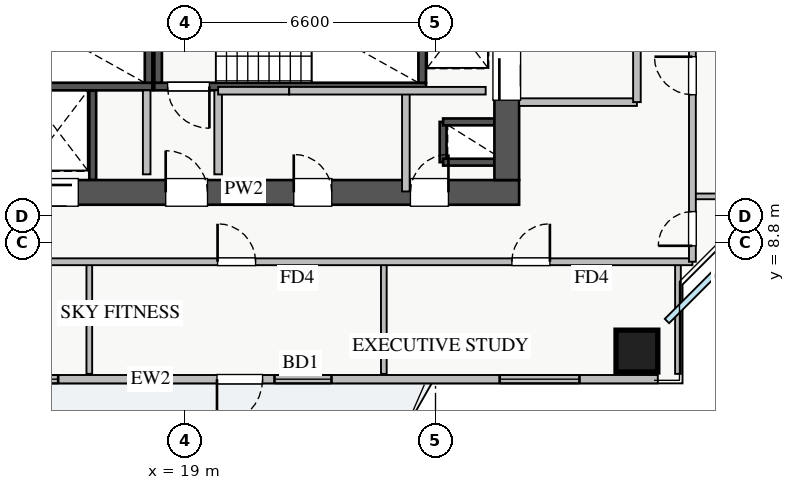
"""IFC4 building model, lengths in metres.
Left out: names, types, materials, properties, quantities, classifications, styles, units other than length and angle.
Written with IfcOpenShell. Run it as: python <this file> out.ifc"""

import sys

from ifc_helpers import new_model, si_unit, direction, frame, frame_2d, origin, origin_2d, place, context, subcontext, project, spatial, rectangle, extrude, source, transform, mapped, element, fill, save


model = new_model("IFC4")
c1 = context("Model", 3, precision=1e-05, world=origin(), true_north=direction((0.0, 1.0)))
c2 = subcontext(c1, "Body", "Model", "MODEL_VIEW")
j1 = project(units=[si_unit("LENGTHUNIT", "METRE"), si_unit("PLANEANGLEUNIT", "RADIAN")], contexts=[c1])
p1 = place(None, origin())
s1 = spatial("IfcSite", under=j1, at=p1, CompositionType="ELEMENT")
p2 = place(p1, origin())
s2 = spatial("IfcBuilding", under=s1, at=p2, CompositionType="ELEMENT")
p3 = place(p2, frame((0.0, 0.0, 106.75)))
s3 = spatial("IfcBuildingStorey", under=s2, at=p3, CompositionType="ELEMENT", Elevation=106.75)
p4 = place(p3, frame((25.8, 10.92, 0.0), z_axis=(0.0, 0.0, 1.0), x_axis=(0.0, 1.0, 0.0)))
e1 = element("IfcWall", 1, at=p4, inside=s3, PredefinedType="SHEAR", context=c2, shape_type="SweptSolid", body=[
    extrude(rectangle(XDim=1.06, YDim=0.18, at=frame_2d((0.53, 0.0))), origin(), (0.0, 0.0, 1.0), 3.07),
])
for number, where, z_axis, x_axis in (
    (2, (25.8, 11.98, 0.0), (0.0, 0.0, 1.0), (1.0, 0.0, 0.0)),
    (3, (25.8, 10.92, 0.0), (0.0, 0.0, 1.0), (1.0, 0.0, 0.0)),
):
    element("IfcWall", number, at=place(p3, frame(where, z_axis=z_axis, x_axis=x_axis)), inside=s3, PredefinedType="SHEAR", context=c2, shape_type="SweptSolid", body=[
        extrude(rectangle(XDim=1.35, YDim=0.18, at=frame_2d((0.675, 0.0))), origin(), (0.0, 0.0, 1.0), 3.07),
    ])
p5 = place(p3, frame((14.62, 12.8, 0.0), z_axis=(0.0, 0.0, 1.0), x_axis=(1.0, 0.0, 0.0)))
e4 = element("IfcWall", 4, at=p5, inside=s3, PredefinedType="SHEAR", context=c2, shape_type="SweptSolid", body=[
    extrude(rectangle(XDim=1.96, YDim=0.18, at=frame_2d((0.98, 0.0))), origin(), (0.0, 0.0, 1.0), 3.07),
])
p6 = place(p3, frame((16.58, 10.45, 0.0), z_axis=(0.0, 0.0, 1.0), x_axis=(0.0, 1.0, 0.0)))
e5 = element("IfcWall", 5, at=p6, inside=s3, PredefinedType="SHEAR", context=c2, shape_type="SweptSolid", body=[
    extrude(rectangle(XDim=2.35, YDim=0.18, at=frame_2d((1.175, 0.0))), origin(), (0.0, 0.0, 1.0), 3.07),
])
p7 = place(p3, frame((10.85, 12.91, 0.0), z_axis=(0.0, 0.0, 1.0), x_axis=(1.0, 0.0, 0.0)))
e6 = element("IfcWall", 6, at=p7, inside=s3, PredefinedType="SHEAR", context=c2, shape_type="SweptSolid", body=[
    extrude(rectangle(XDim=7.3, YDim=0.2, at=frame_2d((3.65, 0.0))), origin(), (0.0, 0.0, 1.0), 3.25),
])
p8 = place(p7, frame((0.35, 0.0, 0.0)))
e7 = element("IfcOpeningElement", 7, at=p8, cuts=e6, PredefinedType="OPENING", context=c2, shape_type="SweptSolid", body=[
    extrude(rectangle(XDim=1.1, YDim=2.05, at=frame_2d((0.55, 1.025))), frame((0.0, 0.11, 0.0), z_axis=(0.0, -1.0, 0.0), x_axis=(1.0, 0.0, 0.0)), (0.0, 0.0, 1.0), 0.22),
])
p9 = place(p3, frame((18.05, 13.01, 0.0), z_axis=(0.0, 0.0, 1.0), x_axis=(0.0, 1.0, 0.0)))
e8 = element("IfcWall", 8, at=p9, inside=s3, PredefinedType="SHEAR", context=c2, shape_type="SweptSolid", body=[
    extrude(rectangle(XDim=2.94, YDim=0.2, at=frame_2d((1.47, 0.0))), origin(), (0.0, 0.0, 1.0), 3.25),
])
p10 = place(p3, frame((18.2, 12.91, 0.0), z_axis=(0.0, 0.0, 1.0), x_axis=(1.0, 0.0, 0.0)))
e9 = element("IfcWall", 9, at=p10, inside=s3, PredefinedType="SHEAR", context=c2, shape_type="SweptSolid", body=[
    extrude(rectangle(XDim=7.15, YDim=0.2, at=frame_2d((3.575, 0.0))), origin(), (0.0, 0.0, 1.0), 3.25),
])
p11 = place(p10, frame((0.35, 0.0, 0.0)))
e10 = element("IfcOpeningElement", 10, at=p11, cuts=e9, PredefinedType="OPENING", context=c2, shape_type="SweptSolid", body=[
    extrude(rectangle(XDim=1.1, YDim=2.05, at=frame_2d((0.55, 1.025))), frame((0.0, 0.11, 0.0), z_axis=(0.0, -1.0, 0.0), x_axis=(1.0, 0.0, 0.0)), (0.0, 0.0, 1.0), 0.22),
])
for number, where, z_axis, x_axis in (
    (11, (18.3, 13.01, 0.0), (0.0, 0.0, 1.0), (0.0, 1.0, 0.0)),
    (12, (25.25, 13.01, 0.0), (0.0, 0.0, 1.0), (0.0, 1.0, 0.0)),
):
    element("IfcWall", number, at=place(p3, frame(where, z_axis=z_axis, x_axis=x_axis)), inside=s3, PredefinedType="SHEAR", context=c2, shape_type="SweptSolid", body=[
        extrude(rectangle(XDim=2.94, YDim=0.2, at=frame_2d((1.47, 0.0))), origin(), (0.0, 0.0, 1.0), 3.25),
    ])
p12 = place(p3, frame((10.2, 10.125, 0.0), z_axis=(0.0, 0.0, 1.0), x_axis=(1.0, 0.0, 0.0)))
e13 = element("IfcWall", 13, at=p12, inside=s3, PredefinedType="SHEAR", context=c2, shape_type="SweptSolid", body=[
    extrude(rectangle(XDim=17.6, YDim=0.65, at=frame_2d((8.8, 0.0))), origin(), (0.0, 0.0, 1.0), 3.25),
])
p13 = place(p12, frame((1.15, 0.0, 0.0)))
e14 = element("IfcOpeningElement", 14, at=p13, cuts=e13, PredefinedType="OPENING", context=c2, shape_type="SweptSolid", body=[
    extrude(rectangle(XDim=1.1, YDim=2.05, at=frame_2d((0.55, 1.025))), frame((0.0, 0.335, 0.0), z_axis=(0.0, -1.0, 0.0), x_axis=(1.0, 0.0, 0.0)), (0.0, 0.0, 1.0), 0.67),
])
p14 = place(p12, frame((8.3, 0.0, 0.0)))
e15 = element("IfcOpeningElement", 15, at=p14, cuts=e13, PredefinedType="OPENING", context=c2, shape_type="SweptSolid", body=[
    extrude(rectangle(XDim=1.1, YDim=2.05, at=frame_2d((0.55, 1.025))), frame((0.0, 0.335, 0.0), z_axis=(0.0, -1.0, 0.0), x_axis=(1.0, 0.0, 0.0)), (0.0, 0.0, 1.0), 0.67),
])
p15 = place(p12, frame((4.9, 0.0, 0.0)))
e16 = element("IfcOpeningElement", 16, at=p15, cuts=e13, PredefinedType="OPENING", context=c2, shape_type="SweptSolid", body=[
    extrude(rectangle(XDim=1.1, YDim=2.05, at=frame_2d((0.55, 1.025))), frame((0.0, 0.335, 0.0), z_axis=(0.0, -1.0, 0.0), x_axis=(1.0, 0.0, 0.0)), (0.0, 0.0, 1.0), 0.67),
])
p16 = place(p12, frame((14.74, 0.0, 0.0)))
e17 = element("IfcOpeningElement", 17, at=p16, cuts=e13, PredefinedType="OPENING", context=c2, shape_type="SweptSolid", body=[
    extrude(rectangle(XDim=1.0, YDim=2.05, at=frame_2d((0.5, 1.025))), frame((0.0, 0.335, 0.0), z_axis=(0.0, -1.0, 0.0), x_axis=(1.0, 0.0, 0.0)), (0.0, 0.0, 1.0), 0.67),
])
p17 = place(p12, frame((11.67, 0.0, 0.0)))
e18 = element("IfcOpeningElement", 18, at=p17, cuts=e13, PredefinedType="OPENING", context=c2, shape_type="SweptSolid", body=[
    extrude(rectangle(XDim=1.0, YDim=2.05, at=frame_2d((0.5, 1.025))), frame((0.0, 0.335, 0.0), z_axis=(0.0, -1.0, 0.0), x_axis=(1.0, 0.0, 0.0)), (0.0, 0.0, 1.0), 0.67),
])
p18 = place(p3, frame((27.475, 10.45, 0.0), z_axis=(0.0, 0.0, 1.0), x_axis=(0.0, 1.0, 0.0)))
e19 = element("IfcWall", 19, at=p18, inside=s3, PredefinedType="SHEAR", context=c2, shape_type="SweptSolid", body=[
    extrude(rectangle(XDim=5.9, YDim=0.65, at=frame_2d((2.95, 0.0))), origin(), (0.0, 0.0, 1.0), 3.25),
])
p19 = place(p18, frame((2.1, 0.0, 0.0)))
e20 = element("IfcOpeningElement", 20, at=p19, cuts=e19, PredefinedType="OPENING", context=c2, shape_type="SweptSolid", body=[
    extrude(rectangle(XDim=1.3, YDim=2.05, at=frame_2d((0.65, 1.025))), frame((0.0, 0.335, 0.0), z_axis=(0.0, -1.0, 0.0), x_axis=(1.0, 0.0, 0.0)), (0.0, 0.0, 1.0), 0.67),
])
m1 = source(origin(), c2, "Body", "SweptSolid", [
    extrude(rectangle(XDim=1.1, YDim=1.1, at=origin_2d()), origin(), (0.0, 0.0, 1.0), 3.25),
])
p20 = place(p3, frame((30.9, 5.95, 0.0), z_axis=(0.0, 0.0, 1.0), x_axis=(1.0, 0.0, 0.0)))
e21 = element("IfcColumn", 21, at=p20, inside=s3, PredefinedType="COLUMN", context=c2, shape_type="MappedRepresentation", body=[
    mapped(m1, transform((0.0, 0.0, 0.0), x_axis=(1.0, 0.0, 0.0), y_axis=(0.0, 1.0, 0.0), z_axis=(0.0, 0.0, 1.0), scale=1.0)),
])
p21 = place(p3, frame((6.55, 5.21, 0.0), z_axis=(0.0, 0.0, 1.0), x_axis=(1.0, 0.0, 0.0)))
e22 = element("IfcWall", 22, at=p21, inside=s3, PredefinedType="STANDARD", context=c2, shape_type="SweptSolid", body=[
    extrude(rectangle(XDim=24.9, YDim=0.22, at=frame_2d((12.45, 0.0))), origin(), (0.0, 0.0, 1.0), 2.61),
])
p22 = place(p21, frame((13.3, 0.0, 0.0)))
e23 = element("IfcOpeningElement", 23, at=p22, cuts=e22, PredefinedType="OPENING", context=c2, shape_type="SweptSolid", body=[
    extrude(rectangle(XDim=1.2, YDim=2.1, at=frame_2d((0.6, 1.05))), frame((0.0, 0.12, 0.0), z_axis=(0.0, -1.0, 0.0), x_axis=(1.0, 0.0, 0.0)), (0.0, 0.0, 1.0), 0.24),
])
p23 = place(p21, frame((0.357, 0.0, 0.9)))
e24 = element("IfcOpeningElement", 24, at=p23, cuts=e22, PredefinedType="OPENING", context=c2, shape_type="SweptSolid", body=[
    extrude(rectangle(XDim=1.5, YDim=1.5, at=frame_2d((0.75, 0.75))), frame((0.0, 0.12, 0.0), z_axis=(0.0, -1.0, 0.0), x_axis=(1.0, 0.0, 0.0)), (0.0, 0.0, 1.0), 0.24),
])
p24 = place(p21, frame((7.321, 0.0, 0.9)))
e25 = element("IfcOpeningElement", 25, at=p24, cuts=e22, PredefinedType="OPENING", context=c2, shape_type="SweptSolid", body=[
    extrude(rectangle(XDim=1.8, YDim=1.5, at=frame_2d((0.9, 0.75))), frame((0.0, 0.12, 0.0), z_axis=(0.0, -1.0, 0.0), x_axis=(1.0, 0.0, 0.0)), (0.0, 0.0, 1.0), 0.24),
])
p25 = place(p21, frame((14.813, 0.0, 0.9)))
e26 = element("IfcOpeningElement", 26, at=p25, cuts=e22, PredefinedType="OPENING", context=c2, shape_type="SweptSolid", body=[
    extrude(rectangle(XDim=1.5, YDim=1.45, at=frame_2d((0.75, 0.725))), frame((0.0, 0.12, 0.0), z_axis=(0.0, -1.0, 0.0), x_axis=(1.0, 0.0, 0.0)), (0.0, 0.0, 1.0), 0.24),
])
p26 = place(p21, frame((20.738, 0.0, 0.9)))
e27 = element("IfcOpeningElement", 27, at=p26, cuts=e22, PredefinedType="OPENING", context=c2, shape_type="SweptSolid", body=[
    extrude(rectangle(XDim=2.1, YDim=1.48, at=frame_2d((1.05, 0.74))), frame((0.0, 0.12, 0.0), z_axis=(0.0, -1.0, 0.0), x_axis=(1.0, 0.0, 0.0)), (0.0, 0.0, 1.0), 0.24),
])
p27 = place(p21, frame((4.136, 0.0, 0.9)))
e28 = element("IfcOpeningElement", 28, at=p27, cuts=e22, PredefinedType="OPENING", context=c2, shape_type="SweptSolid", body=[
    extrude(rectangle(XDim=2.4, YDim=1.5, at=frame_2d((1.2, 0.75))), frame((0.0, 0.12, 0.0), z_axis=(0.0, -1.0, 0.0), x_axis=(1.0, 0.0, 0.0)), (0.0, 0.0, 1.0), 0.24),
])
p28 = place(p3, frame((27.8, 12.5, 0.0), z_axis=(0.0, 0.0, 1.0), x_axis=(1.0, 0.0, 0.0)))
e29 = element("IfcWall", 29, at=p28, inside=s3, PredefinedType="PARTITIONING", context=c2, shape_type="SweptSolid", body=[
    extrude(rectangle(XDim=3.1, YDim=0.2, at=frame_2d((1.55, 0.0))), origin(), (0.0, 0.0, 1.0), 3.07),
])
p29 = place(p3, frame((30.9, 12.5, 0.0), z_axis=(0.0, 0.0, 1.0), x_axis=(0.0, 1.0, 0.0)))
e30 = element("IfcWall", 30, at=p29, inside=s3, PredefinedType="PARTITIONING", context=c2, shape_type="SweptSolid", body=[
    extrude(rectangle(XDim=3.9, YDim=0.2, at=frame_2d((1.95, 0.0))), origin(), (0.0, 0.0, 1.0), 3.07),
])
p30 = place(p29, frame((1.4, 0.0, 0.0)))
e31 = element("IfcOpeningElement", 31, at=p30, cuts=e30, PredefinedType="OPENING", context=c2, shape_type="SweptSolid", body=[
    extrude(rectangle(XDim=1.1, YDim=2.05, at=frame_2d((0.55, 1.025))), frame((0.0, 0.11, 0.0), z_axis=(0.0, -1.0, 0.0), x_axis=(1.0, 0.0, 0.0)), (0.0, 0.0, 1.0), 0.22),
])
for number, where, z_axis, x_axis in (
    (32, (18.0, 10.6, 0.0), (0.0, 0.0, 1.0), (0.0, 1.0, 0.0)),
    (33, (19.88, 10.6, 0.0), (0.0, 0.0, 1.0), (0.0, 1.0, 0.0)),
):
    element("IfcWall", number, at=place(p3, frame(where, z_axis=z_axis, x_axis=x_axis)), inside=s3, PredefinedType="PARTITIONING", context=c2, shape_type="SweptSolid", body=[
        extrude(rectangle(XDim=2.21, YDim=0.2, at=frame_2d((1.105, 0.0))), origin(), (0.0, 0.0, 1.0), 3.07),
    ])
p31 = place(p3, frame((24.82, 10.15, 0.0), z_axis=(0.0, 0.0, 1.0), x_axis=(0.0, 1.0, 0.0)))
e34 = element("IfcWall", 34, at=p31, inside=s3, PredefinedType="PARTITIONING", context=c2, shape_type="SweptSolid", body=[
    extrude(rectangle(XDim=2.65, YDim=0.2, at=frame_2d((1.325, 0.0))), origin(), (0.0, 0.0, 1.0), 3.07),
])
p32 = place(p3, frame((19.88, 12.8, 0.0), z_axis=(0.0, 0.0, 1.0), x_axis=(1.0, 0.0, 0.0)))
e35 = element("IfcWall", 35, at=p32, inside=s3, PredefinedType="PARTITIONING", context=c2, shape_type="SweptSolid", body=[
    extrude(rectangle(XDim=1.87, YDim=0.2, at=frame_2d((0.935, 0.0))), origin(), (0.0, 0.0, 1.0), 3.07),
])
p33 = place(p3, frame((21.75, 12.8, 0.0), z_axis=(0.0, 0.0, 1.0), x_axis=(1.0, 0.0, 0.0)))
e36 = element("IfcWall", 36, at=p33, inside=s3, PredefinedType="PARTITIONING", context=c2, shape_type="SweptSolid", body=[
    extrude(rectangle(XDim=5.17, YDim=0.2, at=frame_2d((2.585, 0.0))), origin(), (0.0, 0.0, 1.0), 3.07),
])
for number, where, z_axis, x_axis in (
    (37, (16.49, 5.35, 0.0), (0.0, 0.0, 1.0), (0.0, 1.0, 0.0)),
    (38, (24.24, 5.35, 0.0), (0.0, 0.0, 1.0), (0.0, 1.0, 0.0)),
    (39, (31.98, 5.35, 0.0), (0.0, 0.0, 1.0), (0.0, 1.0, 0.0)),
):
    element("IfcWall", number, at=place(p3, frame(where, z_axis=z_axis, x_axis=x_axis)), inside=s3, PredefinedType="PARTITIONING", context=c2, shape_type="SweptSolid", body=[
        extrude(rectangle(XDim=2.95, YDim=0.15, at=frame_2d((1.475, 0.0))), origin(), (0.0, 0.0, 1.0), 3.07),
    ])
p34 = place(p3, frame((8.75, 8.3, 0.0), z_axis=(0.0, 0.0, 1.0), x_axis=(1.0, 0.0, 0.0)))
e40 = element("IfcWall", 40, at=p34, inside=s3, PredefinedType="PARTITIONING", context=c2, shape_type="SweptSolid", body=[
    extrude(rectangle(XDim=23.61, YDim=0.18, at=frame_2d((11.805, 0.0))), origin(), (0.0, 0.0, 1.0), 3.07),
])
p35 = place(p34, frame((3.37, 0.0, 0.0)))
e41 = element("IfcOpeningElement", 41, at=p35, cuts=e40, PredefinedType="OPENING", context=c2, shape_type="SweptSolid", body=[
    extrude(rectangle(XDim=1.0, YDim=2.05, at=frame_2d((0.5, 1.025))), frame((0.0, 0.1, 0.0), z_axis=(0.0, -1.0, 0.0), x_axis=(1.0, 0.0, 0.0)), (0.0, 0.0, 1.0), 0.2),
])
p36 = place(p34, frame((11.115, 0.0, 0.0)))
e42 = element("IfcOpeningElement", 42, at=p36, cuts=e40, PredefinedType="OPENING", context=c2, shape_type="SweptSolid", body=[
    extrude(rectangle(XDim=1.0, YDim=2.05, at=frame_2d((0.5, 1.025))), frame((0.0, 0.1, 0.0), z_axis=(0.0, -1.0, 0.0), x_axis=(1.0, 0.0, 0.0)), (0.0, 0.0, 1.0), 0.2),
])
p37 = place(p34, frame((18.86, 0.0, 0.0)))
e43 = element("IfcOpeningElement", 43, at=p37, cuts=e40, PredefinedType="OPENING", context=c2, shape_type="SweptSolid", body=[
    extrude(rectangle(XDim=1.0, YDim=2.05, at=frame_2d((0.5, 1.025))), frame((0.0, 0.1, 0.0), z_axis=(0.0, -1.0, 0.0), x_axis=(1.0, 0.0, 0.0)), (0.0, 0.0, 1.0), 0.2),
])
p38 = place(p3, frame((32.36, 10.02, 0.0), z_axis=(0.0, 0.0, 1.0), x_axis=(1.0, 0.0, 0.0)))
e44 = element("IfcWall", 44, at=p38, inside=s3, PredefinedType="PARTITIONING", context=c2, shape_type="SweptSolid", body=[
    extrude(rectangle(XDim=4.29, YDim=0.15, at=frame_2d((2.145, 0.0))), origin(), (0.0, 0.0, 1.0), 3.07),
])
p39 = place(p3, frame((32.36, 8.3, 0.0), z_axis=(0.0, 0.0, 1.0), x_axis=(0.0, 1.0, 0.0)))
e45 = element("IfcWall", 45, at=p39, inside=s3, PredefinedType="PARTITIONING", context=c2, shape_type="SweptSolid", body=[
    extrude(rectangle(XDim=29.4, YDim=0.18, at=frame_2d((14.7, 0.0))), origin(), (0.0, 0.0, 1.0), 3.07),
])
p40 = place(p39, frame((28.08, 0.0, 0.0)))
e46 = element("IfcOpeningElement", 46, at=p40, cuts=e45, PredefinedType="OPENING", context=c2, shape_type="SweptSolid", body=[
    extrude(rectangle(XDim=0.9, YDim=2.05, at=frame_2d((0.45, 1.025))), frame((0.0, 0.1, 0.0), z_axis=(0.0, -1.0, 0.0), x_axis=(1.0, 0.0, 0.0)), (0.0, 0.0, 1.0), 0.2),
])
p41 = place(p39, frame((0.42, 0.0, 0.0)))
e47 = element("IfcOpeningElement", 47, at=p41, cuts=e45, PredefinedType="OPENING", context=c2, shape_type="SweptSolid", body=[
    extrude(rectangle(XDim=0.9, YDim=2.05, at=frame_2d((0.45, 1.025))), frame((0.0, 0.1, 0.0), z_axis=(0.0, -1.0, 0.0), x_axis=(1.0, 0.0, 0.0)), (0.0, 0.0, 1.0), 0.2),
])
p42 = place(p39, frame((4.395, 0.0, 0.0)))
e48 = element("IfcOpeningElement", 48, at=p42, cuts=e45, PredefinedType="OPENING", context=c2, shape_type="SweptSolid", body=[
    extrude(rectangle(XDim=1.0, YDim=2.05, at=frame_2d((0.5, 1.025))), frame((0.0, 0.1, 0.0), z_axis=(0.0, -1.0, 0.0), x_axis=(1.0, 0.0, 0.0)), (0.0, 0.0, 1.0), 0.2),
])
p43 = place(p39, frame((17.135, 0.0, 0.0)))
e49 = element("IfcOpeningElement", 49, at=p43, cuts=e45, PredefinedType="OPENING", context=c2, shape_type="SweptSolid", body=[
    extrude(rectangle(XDim=1.0, YDim=2.05, at=frame_2d((0.5, 1.025))), frame((0.0, 0.1, 0.0), z_axis=(0.0, -1.0, 0.0), x_axis=(1.0, 0.0, 0.0)), (0.0, 0.0, 1.0), 0.2),
])
m2 = source(origin(), c2, "Body", "SweptSolid", [
    extrude(rectangle(XDim=1.2, YDim=2.1, at=frame_2d((0.6, 1.05))), frame((0.0, 0.025, 0.0), z_axis=(0.0, -1.0, 0.0), x_axis=(1.0, 0.0, 0.0)), (0.0, 0.0, 1.0), 0.05),
])
p44 = place(p22, frame((1.2, 0.0, 0.0), z_axis=(0.0, 0.0, 1.0), x_axis=(-1.0, 0.0, 0.0)))
e50 = element("IfcDoor", 50, at=p44, inside=s3, OperationType="SINGLE_SWING_LEFT", PredefinedType="DOOR", context=c2, shape_type="MappedRepresentation", body=[
    mapped(m2, transform((0.0, 0.0, 0.0), x_axis=(1.0, 0.0, 0.0), y_axis=(0.0, 1.0, 0.0), z_axis=(0.0, 0.0, 1.0), scale=1.0)),
])
fill(e23, e50)
m3 = source(origin(), c2, "Body", "SweptSolid", [
    extrude(rectangle(XDim=1.8, YDim=1.5, at=frame_2d((0.9, 0.75))), frame((0.0, 0.03, 0.0), z_axis=(0.0, -1.0, 0.0), x_axis=(1.0, 0.0, 0.0)), (0.0, 0.0, 1.0), 0.06),
])
p45 = place(p24, origin())
e51 = element("IfcWindow", 51, at=p45, inside=s3, PartitioningType="DOUBLE_PANEL_VERTICAL", PredefinedType="WINDOW", context=c2, shape_type="MappedRepresentation", body=[
    mapped(m3, transform((0.0, 0.0, 0.0), x_axis=(1.0, 0.0, 0.0), y_axis=(0.0, 1.0, 0.0), z_axis=(0.0, 0.0, 1.0), scale=1.0)),
])
fill(e25, e51)
m4 = source(origin(), c2, "Body", "SweptSolid", [
    extrude(rectangle(XDim=1.5, YDim=1.45, at=frame_2d((0.75, 0.725))), frame((0.0, 0.03, 0.0), z_axis=(0.0, -1.0, 0.0), x_axis=(1.0, 0.0, 0.0)), (0.0, 0.0, 1.0), 0.06),
])
p46 = place(p25, origin())
e52 = element("IfcWindow", 52, at=p46, inside=s3, PartitioningType="DOUBLE_PANEL_VERTICAL", PredefinedType="WINDOW", context=c2, shape_type="MappedRepresentation", body=[
    mapped(m4, transform((0.0, 0.0, 0.0), x_axis=(1.0, 0.0, 0.0), y_axis=(0.0, 1.0, 0.0), z_axis=(0.0, 0.0, 1.0), scale=1.0)),
])
fill(e26, e52)
m5 = source(origin(), c2, "Body", "SweptSolid", [
    extrude(rectangle(XDim=2.1, YDim=1.48, at=frame_2d((1.05, 0.74))), frame((0.0, 0.03, 0.0), z_axis=(0.0, -1.0, 0.0), x_axis=(1.0, 0.0, 0.0)), (0.0, 0.0, 1.0), 0.06),
])
p47 = place(p26, origin())
e53 = element("IfcWindow", 53, at=p47, inside=s3, PartitioningType="TRIPLE_PANEL_VERTICAL", PredefinedType="WINDOW", context=c2, shape_type="MappedRepresentation", body=[
    mapped(m5, transform((0.0, 0.0, 0.0), x_axis=(1.0, 0.0, 0.0), y_axis=(0.0, 1.0, 0.0), z_axis=(0.0, 0.0, 1.0), scale=1.0)),
])
fill(e27, e53)
m6 = source(origin(), c2, "Body", "SweptSolid", [
    extrude(rectangle(XDim=1.3, YDim=2.05, at=frame_2d((0.65, 1.025))), frame((0.0, 0.025, 0.0), z_axis=(0.0, -1.0, 0.0), x_axis=(1.0, 0.0, 0.0)), (0.0, 0.0, 1.0), 0.05),
])
p48 = place(p19, origin())
e54 = element("IfcDoor", 54, at=p48, inside=s3, OperationType="SLIDING_TO_RIGHT", PredefinedType="DOOR", context=c2, shape_type="MappedRepresentation", body=[
    mapped(m6, transform((0.0, 0.0, 0.0), x_axis=(1.0, 0.0, 0.0), y_axis=(0.0, 1.0, 0.0), z_axis=(0.0, 0.0, 1.0), scale=1.0)),
])
fill(e20, e54)
m7 = source(origin(), c2, "Body", "SweptSolid", [
    extrude(rectangle(XDim=1.1, YDim=2.05, at=frame_2d((0.55, 1.025))), frame((0.0, 0.025, 0.0), z_axis=(0.0, -1.0, 0.0), x_axis=(1.0, 0.0, 0.0)), (0.0, 0.0, 1.0), 0.05),
])
p49 = place(p14, origin())
e55 = element("IfcDoor", 55, at=p49, inside=s3, OperationType="SINGLE_SWING_LEFT", PredefinedType="DOOR", context=c2, shape_type="MappedRepresentation", body=[
    mapped(m7, transform((0.0, 0.0, 0.0), x_axis=(1.0, 0.0, 0.0), y_axis=(0.0, 1.0, 0.0), z_axis=(0.0, 0.0, 1.0), scale=1.0)),
])
fill(e15, e55)
p50 = place(p11, frame((1.1, 0.0, 0.0), z_axis=(0.0, 0.0, 1.0), x_axis=(-1.0, 0.0, 0.0)))
e56 = element("IfcDoor", 56, at=p50, inside=s3, OperationType="SINGLE_SWING_RIGHT", PredefinedType="DOOR", context=c2, shape_type="MappedRepresentation", body=[
    mapped(m7, transform((0.0, 0.0, 0.0), x_axis=(1.0, 0.0, 0.0), y_axis=(0.0, 1.0, 0.0), z_axis=(0.0, 0.0, 1.0), scale=1.0)),
])
fill(e10, e56)
p51 = place(p15, origin())
e57 = element("IfcDoor", 57, at=p51, inside=s3, OperationType="SLIDING_TO_RIGHT", PredefinedType="DOOR", context=c2, shape_type="MappedRepresentation", body=[
    mapped(m7, transform((0.0, 0.0, 0.0), x_axis=(1.0, 0.0, 0.0), y_axis=(0.0, 1.0, 0.0), z_axis=(0.0, 0.0, 1.0), scale=1.0)),
])
fill(e16, e57)
m8 = source(origin(), c2, "Body", "SweptSolid", [
    extrude(rectangle(XDim=1.0, YDim=2.05, at=frame_2d((0.5, 1.025))), frame((0.0, 0.025, 0.0), z_axis=(0.0, -1.0, 0.0), x_axis=(1.0, 0.0, 0.0)), (0.0, 0.0, 1.0), 0.05),
])
p52 = place(p16, origin())
e58 = element("IfcDoor", 58, at=p52, inside=s3, OperationType="SINGLE_SWING_RIGHT", PredefinedType="DOOR", context=c2, shape_type="MappedRepresentation", body=[
    mapped(m8, transform((0.0, 0.0, 0.0), x_axis=(1.0, 0.0, 0.0), y_axis=(0.0, 1.0, 0.0), z_axis=(0.0, 0.0, 1.0), scale=1.0)),
])
fill(e17, e58)
p53 = place(p17, origin())
e59 = element("IfcDoor", 59, at=p53, inside=s3, OperationType="SINGLE_SWING_LEFT", PredefinedType="DOOR", context=c2, shape_type="MappedRepresentation", body=[
    mapped(m8, transform((0.0, 0.0, 0.0), x_axis=(1.0, 0.0, 0.0), y_axis=(0.0, 1.0, 0.0), z_axis=(0.0, 0.0, 1.0), scale=1.0)),
])
fill(e18, e59)
p54 = place(p36, origin())
e60 = element("IfcDoor", 60, at=p54, inside=s3, OperationType="SINGLE_SWING_LEFT", PredefinedType="DOOR", context=c2, shape_type="MappedRepresentation", body=[
    mapped(m8, transform((0.0, 0.0, 0.0), x_axis=(1.0, 0.0, 0.0), y_axis=(0.0, 1.0, 0.0), z_axis=(0.0, 0.0, 1.0), scale=1.0)),
])
fill(e42, e60)
p55 = place(p37, origin())
e61 = element("IfcDoor", 61, at=p55, inside=s3, OperationType="SINGLE_SWING_RIGHT", PredefinedType="DOOR", context=c2, shape_type="MappedRepresentation", body=[
    mapped(m8, transform((0.0, 0.0, 0.0), x_axis=(1.0, 0.0, 0.0), y_axis=(0.0, 1.0, 0.0), z_axis=(0.0, 0.0, 1.0), scale=1.0)),
])
fill(e43, e61)
m9 = source(origin(), c2, "Body", "SweptSolid", [
    extrude(rectangle(XDim=0.9, YDim=2.05, at=frame_2d((0.45, 1.025))), frame((0.0, 0.025, 0.0), z_axis=(0.0, -1.0, 0.0), x_axis=(1.0, 0.0, 0.0)), (0.0, 0.0, 1.0), 0.05),
])
p56 = place(p41, origin())
e62 = element("IfcDoor", 62, at=p56, inside=s3, OperationType="SINGLE_SWING_LEFT", PredefinedType="DOOR", context=c2, shape_type="MappedRepresentation", body=[
    mapped(m9, transform((0.0, 0.0, 0.0), x_axis=(1.0, 0.0, 0.0), y_axis=(0.0, 1.0, 0.0), z_axis=(0.0, 0.0, 1.0), scale=1.0)),
])
fill(e47, e62)
p57 = place(p42, origin())
e63 = element("IfcDoor", 63, at=p57, inside=s3, OperationType="SINGLE_SWING_RIGHT", PredefinedType="DOOR", context=c2, shape_type="MappedRepresentation", body=[
    mapped(m8, transform((0.0, 0.0, 0.0), x_axis=(1.0, 0.0, 0.0), y_axis=(0.0, 1.0, 0.0), z_axis=(0.0, 0.0, 1.0), scale=1.0)),
])
fill(e48, e63)
save(model, sys.argv[1])
